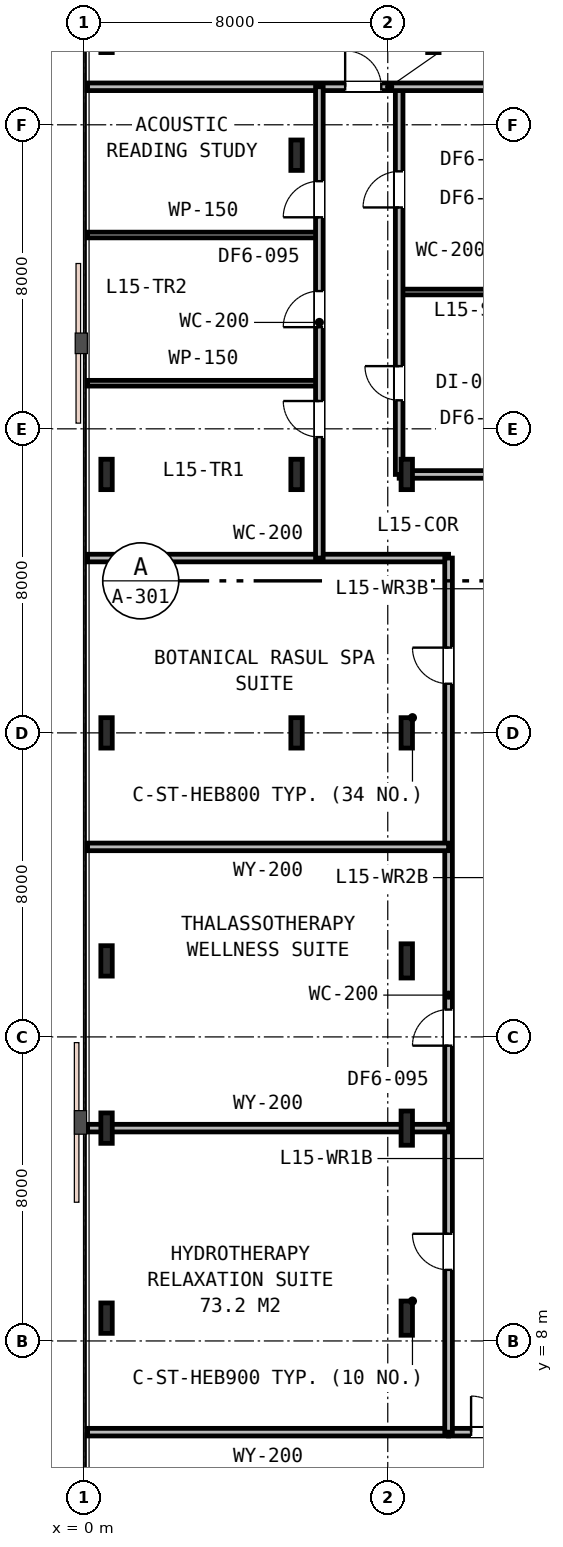
"""IFC4 building model, lengths in metres.
Left out: names, types, materials, properties, quantities, classifications, styles, units other than length and angle.
Written with IfcOpenShell. Run it as: python <this file> out.ifc"""

import sys

from ifc_helpers import new_model, si_unit, direction, frame, frame_2d, origin, origin_2d, place, context, subcontext, project, spatial, rectangle, i_section, extrude, element, fill, save


model = new_model("IFC4")
c1 = context("Model", 3, precision=1e-05, world=origin(), true_north=direction((0.0, 1.0)))
c2 = subcontext(c1, "Body", "Model", "MODEL_VIEW")
j1 = project(units=[si_unit("LENGTHUNIT", "METRE"), si_unit("PLANEANGLEUNIT", "RADIAN")], contexts=[c1])
p1 = place(None, origin())
s1 = spatial("IfcSite", under=j1, at=p1, CompositionType="ELEMENT")
p2 = place(p1, origin())
s2 = spatial("IfcBuilding", under=s1, at=p2, CompositionType="ELEMENT")
p3 = place(p2, frame((0.0, 0.0, 61.8)))
s3 = spatial("IfcBuildingStorey", under=s2, at=p3, CompositionType="ELEMENT", Elevation=61.8)
for number, where, z_axis, x_axis in (
    (1, (8.5, 24.0, 0.0), (0.0, 0.0, 1.0), (1.0, 0.0, 0.0)),
    (2, (5.6, 24.0, 0.0), (0.0, 0.0, 1.0), (1.0, 0.0, 0.0)),
    (3, (5.6, 30.8, 0.0), (0.0, 0.0, 1.0), (1.0, 0.0, 0.0)),
    (4, (5.6, 39.2, 0.0), (0.0, 0.0, 1.0), (1.0, 0.0, 0.0)),
    (5, (8.5, 30.8, 0.0), (0.0, 0.0, 1.0), (1.0, 0.0, 0.0)),
    (6, (9.2, 42.3, 0.0), (0.0, 0.0, 1.0), (1.0, 0.0, 0.0)),
    (7, (0.6, 24.0, 0.0), (0.0, 0.0, 1.0), (1.0, 0.0, 0.0)),
    (8, (0.6, 30.8, 0.0), (0.0, 0.0, 1.0), (1.0, 0.0, 0.0)),
    (9, (0.6, 42.3, 0.0), (0.0, 0.0, 1.0), (1.0, 0.0, 0.0)),
    (10, (0.6, 8.6, 0.0), (0.0, 0.0, 1.0), (1.0, 0.0, 0.0)),
    (11, (0.6, 13.6, 0.0), (0.0, 0.0, 1.0), (1.0, 0.0, 0.0)),
    (12, (0.6, 18.0, 0.0), (0.0, 0.0, 1.0), (1.0, 0.0, 0.0)),
):
    element("IfcColumn", number, at=place(p3, frame(where, z_axis=z_axis, x_axis=x_axis)), inside=s3, PredefinedType="COLUMN", context=c2, shape_type="SweptSolid", body=[
        extrude(i_section(OverallWidth=0.3, OverallDepth=0.8, WebThickness=0.018, FlangeThickness=0.033, FilletRadius=0.03, at=origin_2d()), origin(), (0.0, 0.0, 1.0), 3.6),
    ])
for number, where, z_axis, x_axis in (
    (13, (8.5, 8.6, 0.0), (0.0, 0.0, 1.0), (1.0, 0.0, 0.0)),
    (14, (8.5, 13.6, 0.0), (0.0, 0.0, 1.0), (1.0, 0.0, 0.0)),
    (15, (8.5, 18.0, 0.0), (0.0, 0.0, 1.0), (1.0, 0.0, 0.0)),
):
    element("IfcColumn", number, at=place(p3, frame(where, z_axis=z_axis, x_axis=x_axis)), inside=s3, PredefinedType="COLUMN", context=c2, shape_type="SweptSolid", body=[
        extrude(i_section(OverallWidth=0.3, OverallDepth=0.9, WebThickness=0.018, FlangeThickness=0.035, FilletRadius=0.03, at=origin_2d()), origin(), (0.0, 0.0, 1.0), 3.6),
    ])
p4 = place(p3, frame((0.1, 28.6, 0.0), z_axis=(0.0, 0.0, 1.0), x_axis=(1.0, 0.0, 0.0)))
e16 = element("IfcWall", 16, at=p4, inside=s3, PredefinedType="PARTITIONING", context=c2, shape_type="SweptSolid", body=[
    extrude(rectangle(XDim=9.5, YDim=0.2, at=frame_2d((4.75, 0.0))), origin(), (0.0, 0.0, 1.0), 2.82),
])
p5 = place(p3, frame((8.3, 35.6, 0.0), z_axis=(0.0, 0.0, 1.0), x_axis=(1.0, 0.0, 0.0)))
e17 = element("IfcWall", 17, at=p5, inside=s3, PredefinedType="PARTITIONING", context=c2, shape_type="SweptSolid", body=[
    extrude(rectangle(XDim=7.7, YDim=0.15, at=frame_2d((3.85, 0.0))), origin(), (0.0, 0.0, 1.0), 2.82),
])
p6 = place(p3, frame((8.3, 30.8, 0.0), z_axis=(0.0, 0.0, 1.0), x_axis=(1.0, 0.0, 0.0)))
e18 = element("IfcWall", 18, at=p6, inside=s3, PredefinedType="PARTITIONING", context=c2, shape_type="SweptSolid", body=[
    extrude(rectangle(XDim=7.7, YDim=0.2, at=frame_2d((3.85, 0.0))), origin(), (0.0, 0.0, 1.0), 2.82),
])
p7 = place(p6, frame((5.325, 0.0, 0.0)))
e19 = element("IfcOpeningElement", 19, at=p7, cuts=e18, PredefinedType="OPENING", context=c2, shape_type="SweptSolid", body=[
    extrude(rectangle(XDim=0.95, YDim=2.15, at=frame_2d((0.475, 1.075))), frame((0.0, 0.11, 0.0), z_axis=(0.0, -1.0, 0.0), x_axis=(1.0, 0.0, 0.0)), (0.0, 0.0, 1.0), 0.22),
])
p8 = place(p3, frame((8.3, 30.8, 0.0), z_axis=(0.0, 0.0, 1.0), x_axis=(0.0, 1.0, 0.0)))
e20 = element("IfcWall", 20, at=p8, inside=s3, PredefinedType="PARTITIONING", context=c2, shape_type="SweptSolid", body=[
    extrude(rectangle(XDim=10.2, YDim=0.2, at=frame_2d((5.1, 0.0))), origin(), (0.0, 0.0, 1.0), 2.82),
])
p9 = place(p8, frame((1.95, 0.0, 0.0)))
e21 = element("IfcOpeningElement", 21, at=p9, cuts=e20, PredefinedType="OPENING", context=c2, shape_type="SweptSolid", body=[
    extrude(rectangle(XDim=0.9, YDim=2.15, at=frame_2d((0.45, 1.075))), frame((0.0, 0.11, 0.0), z_axis=(0.0, -1.0, 0.0), x_axis=(1.0, 0.0, 0.0)), (0.0, 0.0, 1.0), 0.22),
])
p10 = place(p8, frame((7.025, 0.0, 0.0)))
e22 = element("IfcOpeningElement", 22, at=p10, cuts=e20, PredefinedType="OPENING", context=c2, shape_type="SweptSolid", body=[
    extrude(rectangle(XDim=0.95, YDim=2.15, at=frame_2d((0.475, 1.075))), frame((0.0, 0.11, 0.0), z_axis=(0.0, -1.0, 0.0), x_axis=(1.0, 0.0, 0.0)), (0.0, 0.0, 1.0), 0.22),
])
p11 = place(p3, frame((0.1, 41.0, 0.0), z_axis=(0.0, 0.0, 1.0), x_axis=(1.0, 0.0, 0.0)))
e23 = element("IfcWall", 23, at=p11, inside=s3, PredefinedType="PARTITIONING", context=c2, shape_type="SweptSolid", body=[
    extrude(rectangle(XDim=15.9, YDim=0.2, at=frame_2d((7.95, 0.0))), origin(), (0.0, 0.0, 1.0), 2.82),
])
p12 = place(p11, frame((6.779, 0.0, 0.0)))
e24 = element("IfcOpeningElement", 24, at=p12, cuts=e23, PredefinedType="OPENING", context=c2, shape_type="SweptSolid", body=[
    extrude(rectangle(XDim=0.95, YDim=2.15, at=frame_2d((0.475, 1.075))), frame((0.0, 0.11, 0.0), z_axis=(0.0, -1.0, 0.0), x_axis=(1.0, 0.0, 0.0)), (0.0, 0.0, 1.0), 0.22),
])
for number, where, z_axis, x_axis in (
    (25, (0.1, 33.2, 0.0), (0.0, 0.0, 1.0), (1.0, 0.0, 0.0)),
    (26, (0.1, 37.1, 0.0), (0.0, 0.0, 1.0), (1.0, 0.0, 0.0)),
):
    element("IfcWall", number, at=place(p3, frame(where, z_axis=z_axis, x_axis=x_axis)), inside=s3, PredefinedType="PARTITIONING", context=c2, shape_type="SweptSolid", body=[
        extrude(rectangle(XDim=6.1, YDim=0.15, at=frame_2d((3.05, 0.0))), origin(), (0.0, 0.0, 1.0), 2.82),
    ])
p13 = place(p3, frame((6.2, 28.6, 0.0), z_axis=(0.0, 0.0, 1.0), x_axis=(0.0, 1.0, 0.0)))
e27 = element("IfcWall", 27, at=p13, inside=s3, PredefinedType="PARTITIONING", context=c2, shape_type="SweptSolid", body=[
    extrude(rectangle(XDim=12.4, YDim=0.2, at=frame_2d((6.2, 0.0))), origin(), (0.0, 0.0, 1.0), 2.82),
])
p14 = place(p13, frame((3.182, 0.0, 0.0)))
e28 = element("IfcOpeningElement", 28, at=p14, cuts=e27, PredefinedType="OPENING", context=c2, shape_type="SweptSolid", body=[
    extrude(rectangle(XDim=0.95, YDim=2.15, at=frame_2d((0.475, 1.075))), frame((0.0, 0.11, 0.0), z_axis=(0.0, -1.0, 0.0), x_axis=(1.0, 0.0, 0.0)), (0.0, 0.0, 1.0), 0.22),
])
p15 = place(p13, frame((6.075, 0.0, 0.0)))
e29 = element("IfcOpeningElement", 29, at=p15, cuts=e27, PredefinedType="OPENING", context=c2, shape_type="SweptSolid", body=[
    extrude(rectangle(XDim=0.95, YDim=2.15, at=frame_2d((0.475, 1.075))), frame((0.0, 0.11, 0.0), z_axis=(0.0, -1.0, 0.0), x_axis=(1.0, 0.0, 0.0)), (0.0, 0.0, 1.0), 0.22),
])
p16 = place(p13, frame((8.966, 0.0, 0.0)))
e30 = element("IfcOpeningElement", 30, at=p16, cuts=e27, PredefinedType="OPENING", context=c2, shape_type="SweptSolid", body=[
    extrude(rectangle(XDim=0.95, YDim=2.15, at=frame_2d((0.475, 1.075))), frame((0.0, 0.11, 0.0), z_axis=(0.0, -1.0, 0.0), x_axis=(1.0, 0.0, 0.0)), (0.0, 0.0, 1.0), 0.22),
])
p17 = place(p3, frame((0.1, 5.6, 0.0), z_axis=(0.0, 0.0, 1.0), x_axis=(1.0, 0.0, 0.0)))
e31 = element("IfcWall", 31, at=p17, inside=s3, PredefinedType="PARTITIONING", context=c2, shape_type="SweptSolid", body=[
    extrude(rectangle(XDim=9.5, YDim=0.2, at=frame_2d((4.75, 0.0))), origin(), (0.0, 0.0, 1.0), 2.93),
])
p18 = place(p3, frame((9.6, 5.6, 0.0), z_axis=(0.0, 0.0, 1.0), x_axis=(1.0, 0.0, 0.0)))
e32 = element("IfcWall", 32, at=p18, inside=s3, PredefinedType="PARTITIONING", context=c2, shape_type="SweptSolid", body=[
    extrude(rectangle(XDim=2.2, YDim=0.2, at=frame_2d((1.1, 0.0))), origin(), (0.0, 0.0, 1.0), 3.33),
])
p19 = place(p18, frame((0.593, 0.0, 0.0)))
e33 = element("IfcOpeningElement", 33, at=p19, cuts=e32, PredefinedType="OPENING", context=c2, shape_type="SweptSolid", body=[
    extrude(rectangle(XDim=0.95, YDim=2.15, at=frame_2d((0.475, 1.075))), frame((0.0, 0.11, 0.0), z_axis=(0.0, -1.0, 0.0), x_axis=(1.0, 0.0, 0.0)), (0.0, 0.0, 1.0), 0.22),
])
p20 = place(p3, frame((9.6, 5.6, 0.0), z_axis=(0.0, 0.0, 1.0), x_axis=(0.0, 1.0, 0.0)))
e34 = element("IfcWall", 34, at=p20, inside=s3, PredefinedType="PARTITIONING", context=c2, shape_type="SweptSolid", body=[
    extrude(rectangle(XDim=23.0, YDim=0.2, at=frame_2d((11.5, 0.0))), origin(), (0.0, 0.0, 1.0), 2.82),
])
p21 = place(p20, frame((4.27, 0.0, 0.0)))
e35 = element("IfcOpeningElement", 35, at=p21, cuts=e34, PredefinedType="OPENING", context=c2, shape_type="SweptSolid", body=[
    extrude(rectangle(XDim=0.95, YDim=2.15, at=frame_2d((0.475, 1.075))), frame((0.0, 0.11, 0.0), z_axis=(0.0, -1.0, 0.0), x_axis=(1.0, 0.0, 0.0)), (0.0, 0.0, 1.0), 0.22),
])
p22 = place(p20, frame((10.17, 0.0, 0.0)))
e36 = element("IfcOpeningElement", 36, at=p22, cuts=e34, PredefinedType="OPENING", context=c2, shape_type="SweptSolid", body=[
    extrude(rectangle(XDim=0.95, YDim=2.15, at=frame_2d((0.475, 1.075))), frame((0.0, 0.11, 0.0), z_axis=(0.0, -1.0, 0.0), x_axis=(1.0, 0.0, 0.0)), (0.0, 0.0, 1.0), 0.22),
])
p23 = place(p20, frame((19.693, 0.0, 0.0)))
e37 = element("IfcOpeningElement", 37, at=p23, cuts=e34, PredefinedType="OPENING", context=c2, shape_type="SweptSolid", body=[
    extrude(rectangle(XDim=0.95, YDim=2.15, at=frame_2d((0.475, 1.075))), frame((0.0, 0.11, 0.0), z_axis=(0.0, -1.0, 0.0), x_axis=(1.0, 0.0, 0.0)), (0.0, 0.0, 1.0), 0.22),
])
for number, where, z_axis, x_axis in (
    (38, (0.1, 13.6, 0.0), (0.0, 0.0, 1.0), (1.0, 0.0, 0.0)),
    (39, (0.1, 21.0, 0.0), (0.0, 0.0, 1.0), (1.0, 0.0, 0.0)),
):
    element("IfcWall", number, at=place(p3, frame(where, z_axis=z_axis, x_axis=x_axis)), inside=s3, PredefinedType="PARTITIONING", context=c2, shape_type="SweptSolid", body=[
        extrude(rectangle(XDim=9.5, YDim=0.2, at=frame_2d((4.75, 0.0))), origin(), (0.0, 0.0, 1.0), 2.82),
    ])
p24 = place(p9, origin())
e40 = element("IfcDoor", 40, at=p24, inside=s3, OperationType="SINGLE_SWING_RIGHT", PredefinedType="DOOR", context=c2, shape_type="SweptSolid", body=[
    extrude(rectangle(XDim=0.9, YDim=2.15, at=frame_2d((0.45, 1.075))), frame((0.0, 0.025, 0.0), z_axis=(0.0, -1.0, 0.0), x_axis=(1.0, 0.0, 0.0)), (0.0, 0.0, 1.0), 0.05),
])
fill(e21, e40)
p25 = place(p12, origin())
e41 = element("IfcDoor", 41, at=p25, inside=s3, OperationType="SINGLE_SWING_LEFT", PredefinedType="DOOR", context=c2, shape_type="SweptSolid", body=[
    extrude(rectangle(XDim=0.95, YDim=2.15, at=frame_2d((0.475, 1.075))), frame((0.0, 0.025, 0.0), z_axis=(0.0, -1.0, 0.0), x_axis=(1.0, 0.0, 0.0)), (0.0, 0.0, 1.0), 0.05),
])
fill(e24, e41)
p26 = place(p14, origin())
e42 = element("IfcDoor", 42, at=p26, inside=s3, OperationType="SINGLE_SWING_RIGHT", PredefinedType="DOOR", context=c2, shape_type="SweptSolid", body=[
    extrude(rectangle(XDim=0.95, YDim=2.15, at=frame_2d((0.475, 1.075))), frame((0.0, 0.025, 0.0), z_axis=(0.0, -1.0, 0.0), x_axis=(1.0, 0.0, 0.0)), (0.0, 0.0, 1.0), 0.05),
])
fill(e28, e42)
p27 = place(p15, origin())
e43 = element("IfcDoor", 43, at=p27, inside=s3, OperationType="SINGLE_SWING_LEFT", PredefinedType="DOOR", context=c2, shape_type="SweptSolid", body=[
    extrude(rectangle(XDim=0.95, YDim=2.15, at=frame_2d((0.475, 1.075))), frame((0.0, 0.025, 0.0), z_axis=(0.0, -1.0, 0.0), x_axis=(1.0, 0.0, 0.0)), (0.0, 0.0, 1.0), 0.05),
])
fill(e29, e43)
p28 = place(p16, origin())
e44 = element("IfcDoor", 44, at=p28, inside=s3, OperationType="SINGLE_SWING_LEFT", PredefinedType="DOOR", context=c2, shape_type="SweptSolid", body=[
    extrude(rectangle(XDim=0.95, YDim=2.15, at=frame_2d((0.475, 1.075))), frame((0.0, 0.025, 0.0), z_axis=(0.0, -1.0, 0.0), x_axis=(1.0, 0.0, 0.0)), (0.0, 0.0, 1.0), 0.05),
])
fill(e30, e44)
p29 = place(p10, origin())
e45 = element("IfcDoor", 45, at=p29, inside=s3, OperationType="SINGLE_SWING_LEFT", PredefinedType="DOOR", context=c2, shape_type="SweptSolid", body=[
    extrude(rectangle(XDim=0.95, YDim=2.15, at=frame_2d((0.475, 1.075))), frame((0.0, 0.025, 0.0), z_axis=(0.0, -1.0, 0.0), x_axis=(1.0, 0.0, 0.0)), (0.0, 0.0, 1.0), 0.05),
])
fill(e22, e45)
p30 = place(p19, origin())
e46 = element("IfcDoor", 46, at=p30, inside=s3, OperationType="SINGLE_SWING_LEFT", PredefinedType="DOOR", context=c2, shape_type="SweptSolid", body=[
    extrude(rectangle(XDim=0.95, YDim=2.15, at=frame_2d((0.475, 1.075))), frame((0.0, 0.025, 0.0), z_axis=(0.0, -1.0, 0.0), x_axis=(1.0, 0.0, 0.0)), (0.0, 0.0, 1.0), 0.05),
])
fill(e33, e46)
p31 = place(p21, origin())
e47 = element("IfcDoor", 47, at=p31, inside=s3, OperationType="SINGLE_SWING_RIGHT", PredefinedType="DOOR", context=c2, shape_type="SweptSolid", body=[
    extrude(rectangle(XDim=0.95, YDim=2.15, at=frame_2d((0.475, 1.075))), frame((0.0, 0.025, 0.0), z_axis=(0.0, -1.0, 0.0), x_axis=(1.0, 0.0, 0.0)), (0.0, 0.0, 1.0), 0.05),
])
fill(e35, e47)
p32 = place(p22, origin())
e48 = element("IfcDoor", 48, at=p32, inside=s3, OperationType="SINGLE_SWING_LEFT", PredefinedType="DOOR", context=c2, shape_type="SweptSolid", body=[
    extrude(rectangle(XDim=0.95, YDim=2.15, at=frame_2d((0.475, 1.075))), frame((0.0, 0.025, 0.0), z_axis=(0.0, -1.0, 0.0), x_axis=(1.0, 0.0, 0.0)), (0.0, 0.0, 1.0), 0.05),
])
fill(e36, e48)
p33 = place(p23, origin())
e49 = element("IfcDoor", 49, at=p33, inside=s3, OperationType="SINGLE_SWING_RIGHT", PredefinedType="DOOR", context=c2, shape_type="SweptSolid", body=[
    extrude(rectangle(XDim=0.95, YDim=2.15, at=frame_2d((0.475, 1.075))), frame((0.0, 0.025, 0.0), z_axis=(0.0, -1.0, 0.0), x_axis=(1.0, 0.0, 0.0)), (0.0, 0.0, 1.0), 0.05),
])
fill(e37, e49)
save(model, sys.argv[1])
